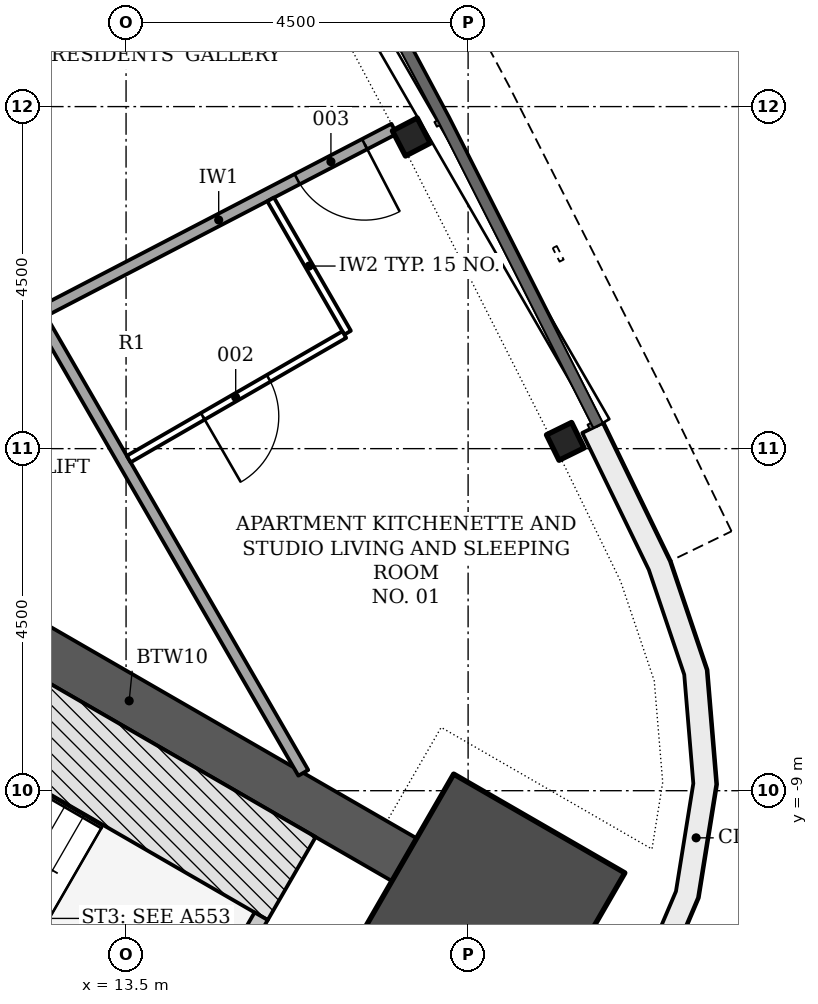
"""IFC4 building model, lengths in metres.
Left out: names, types, materials, properties, quantities, classifications, styles, units other than length and angle.
Written with IfcOpenShell. Run it as: python <this file> out.ifc"""

import sys

from ifc_helpers import new_model, si_unit, direction, frame, frame_2d, origin, origin_2d, place, context, subcontext, project, spatial, polyline, rectangle, i_section, outline, extrude, element, fill, save


model = new_model("IFC4")
c1 = context("Model", 3, precision=1e-05, world=origin(), true_north=direction((0.0, 1.0)))
c2 = subcontext(c1, "Body", "Model", "MODEL_VIEW")
j1 = project(units=[si_unit("LENGTHUNIT", "METRE"), si_unit("PLANEANGLEUNIT", "RADIAN")], contexts=[c1])
p1 = place(None, origin())
s1 = spatial("IfcSite", under=j1, at=p1, CompositionType="ELEMENT")
p2 = place(p1, origin())
s2 = spatial("IfcBuilding", under=s1, at=p2, CompositionType="ELEMENT")
p3 = place(p2, frame((0.0, 0.0, 222.0)))
s3 = spatial("IfcBuildingStorey", under=s2, at=p3, CompositionType="ELEMENT", Elevation=222.0)
p4 = place(p3, frame((9.922, -5.728, -0.2), z_axis=(0.0, 0.0, 1.0), x_axis=(0.866030911543, -0.499990460161, 0.0)))
e1 = element("IfcWall", 1, at=p4, inside=s3, PredefinedType="SHEAR", context=c2, shape_type="SweptSolid", body=[
    extrude(rectangle(XDim=8.359, YDim=0.65, at=frame_2d((4.179, 0.0))), origin(), (0.0, 0.0, 1.0), 3.6),
])
p5 = place(p3, frame((18.286, -10.558, -0.2), z_axis=(0.0, 0.0, 1.0), x_axis=(0.866025403784, -0.5, 0.0)))
e2 = element("IfcColumn", 2, at=p5, inside=s3, PredefinedType="COLUMN", context=c2, shape_type="SweptSolid", body=[
    extrude(rectangle(XDim=2.6, YDim=2.6, at=origin_2d()), origin(), (0.0, 0.0, 1.0), 3.6),
])
for number, where, z_axis, x_axis in (
    (3, (19.279, -4.404, -0.2), (0.0, 0.0, 1.0), (-0.441, 0.897, 0.0)),
    (4, (17.253, -0.4, -0.2), (0.0, 0.0, 1.0), (-0.461, 0.887, 0.0)),
):
    element("IfcColumn", number, at=place(p3, frame(where, z_axis=z_axis, x_axis=x_axis)), inside=s3, PredefinedType="COLUMN", context=c2, shape_type="SweptSolid", body=[
        extrude(i_section(OverallWidth=0.373, OverallDepth=0.368, WebThickness=0.015, FlangeThickness=0.024, FilletRadius=0.015, at=origin_2d()), origin(), (0.0, 0.0, 1.0), 3.6),
    ])
p6 = place(p3, origin())
e5 = element("IfcWall", 5, at=p6, inside=s3, PredefinedType="NOTDEFINED", context=c2, shape_type="SweptSolid", body=[
    extrude(outline(polyline([(13.49, -15.042), (15.507, -14.898), (16.988, -14.602), (18.354, -13.958), (19.526, -13.004), (20.434, -11.797), (21.025, -10.408), (21.265, -8.917), (21.139, -7.411), (20.656, -5.98), (19.772, -4.162), (19.502, -4.293), (20.378, -6.094), (20.844, -7.473), (20.963, -8.905), (20.735, -10.324), (20.172, -11.646), (19.308, -12.795), (18.193, -13.702), (16.893, -14.315), (15.467, -14.6), (13.469, -14.743), (13.49, -15.042)])), origin(), (0.0, 0.0, 1.0), 3.3),
])
p7 = place(p3, frame((9.444, -6.555, -0.2), z_axis=(0.0, 0.0, 1.0), x_axis=(0.866018442252, -0.500012057535, 0.0)))
e6 = element("IfcWall", 6, at=p7, inside=s3, PredefinedType="SHEAR", context=c2, shape_type="SweptSolid", body=[
    extrude(rectangle(XDim=7.2, YDim=1.261, at=frame_2d((3.6, 0.0))), origin(), (0.0, 0.0, 1.0), 3.6),
])
p8 = place(p3, frame((0.0, 0.0, -0.2)))
e7 = element("IfcWall", 7, at=p8, inside=s3, PredefinedType="SHEAR", context=c2, shape_type="SweptSolid", body=[
    extrude(outline(polyline([(12.104, -13.149), (14.289, -12.563), (15.364, -10.701), (15.191, -10.601), (14.157, -12.392), (12.132, -12.934), (12.204, -12.976), (12.204, -12.976), (12.204, -12.976), (12.204, -12.976), (12.204, -12.976), (12.204, -12.976), (12.204, -12.976), (12.204, -12.976), (12.204, -12.976), (12.204, -12.976), (12.204, -12.976), (12.204, -12.976), (12.204, -12.976), (12.204, -12.976), (12.204, -12.976), (12.204, -12.976), (12.204, -12.976), (12.104, -13.149)])), origin(), (0.0, 0.0, 1.0), 3.6),
])
p9 = place(p3, frame((15.832, -8.765, 0.0), z_axis=(0.0, 0.0, 1.0), x_axis=(-0.500009302692, 0.866020032806, 0.0)))
e8 = element("IfcWall", 8, at=p9, inside=s3, PredefinedType="PARTITIONING", context=c2, shape_type="SweptSolid", body=[
    extrude(rectangle(XDim=6.974, YDim=0.15, at=frame_2d((3.487, 0.0))), origin(), (0.0, 0.0, 1.0), 2.852),
])
p10 = place(p3, frame((17.026, -0.292, 0.0), z_axis=(0.0, 0.0, 1.0), x_axis=(-0.887303639302, -0.461185701947, 0.0)))
e9 = element("IfcWall", 9, at=p10, inside=s3, PredefinedType="PARTITIONING", context=c2, shape_type="SweptSolid", body=[
    extrude(rectangle(XDim=5.201, YDim=0.15, at=frame_2d((2.6, 0.0))), origin(), (0.0, 0.0, 1.0), 3.4),
])
p11 = place(p10, frame((0.436, 0.0, 0.0)))
e10 = element("IfcOpeningElement", 10, at=p11, cuts=e9, PredefinedType="OPENING", context=c2, shape_type="SweptSolid", body=[
    extrude(rectangle(XDim=1.0, YDim=2.1, at=frame_2d((0.5, 1.05))), frame((0.0, 0.085, 0.0), z_axis=(0.0, -1.0, 0.0), x_axis=(1.0, 0.0, 0.0)), (0.0, 0.0, 1.0), 0.17),
])
p12 = place(p3, frame((15.402, -1.221, 0.0), z_axis=(0.0, 0.0, 1.0), x_axis=(0.499990325971, -0.866030989016, 0.0)))
e11 = element("IfcWall", 11, at=p12, inside=s3, PredefinedType="PARTITIONING", context=c2, shape_type="SweptSolid", body=[
    extrude(rectangle(XDim=2.025, YDim=0.1, at=frame_2d((1.012, 0.0))), origin(), (0.0, 0.0, 1.0), 2.852),
])
p13 = place(p3, frame((16.371, -3.0, 0.0), z_axis=(0.0, 0.0, 1.0), x_axis=(-0.866027924134, -0.499995634601, 0.0)))
e12 = element("IfcWall", 12, at=p13, inside=s3, PredefinedType="PARTITIONING", context=c2, shape_type="SweptSolid", body=[
    extrude(rectangle(XDim=3.275, YDim=0.1, at=frame_2d((1.637, 0.0))), origin(), (0.0, 0.0, 1.0), 3.4),
])
p14 = place(p13, frame((1.15, 0.0, 0.0)))
e13 = element("IfcOpeningElement", 13, at=p14, cuts=e12, PredefinedType="OPENING", context=c2, shape_type="SweptSolid", body=[
    extrude(rectangle(XDim=1.0, YDim=2.1, at=frame_2d((0.5, 1.05))), frame((0.0, 0.06, 0.0), z_axis=(0.0, -1.0, 0.0), x_axis=(1.0, 0.0, 0.0)), (0.0, 0.0, 1.0), 0.12),
])
p15 = place(p14, origin())
e14 = element("IfcDoor", 14, at=p15, inside=s3, OperationType="SINGLE_SWING_RIGHT", PredefinedType="DOOR", context=c2, shape_type="SweptSolid", body=[
    extrude(rectangle(XDim=1.0, YDim=2.1, at=frame_2d((0.5, 1.05))), frame((0.0, 0.025, 0.0), z_axis=(0.0, -1.0, 0.0), x_axis=(1.0, 0.0, 0.0)), (0.0, 0.0, 1.0), 0.05),
])
fill(e13, e14)
p16 = place(p11, origin())
e15 = element("IfcDoor", 15, at=p16, inside=s3, OperationType="SINGLE_SWING_LEFT", PredefinedType="DOOR", context=c2, shape_type="SweptSolid", body=[
    extrude(rectangle(XDim=1.0, YDim=2.1, at=frame_2d((0.5, 1.05))), frame((0.0, 0.025, 0.0), z_axis=(0.0, -1.0, 0.0), x_axis=(1.0, 0.0, 0.0)), (0.0, 0.0, 1.0), 0.05),
])
fill(e10, e15)
save(model, sys.argv[1])
